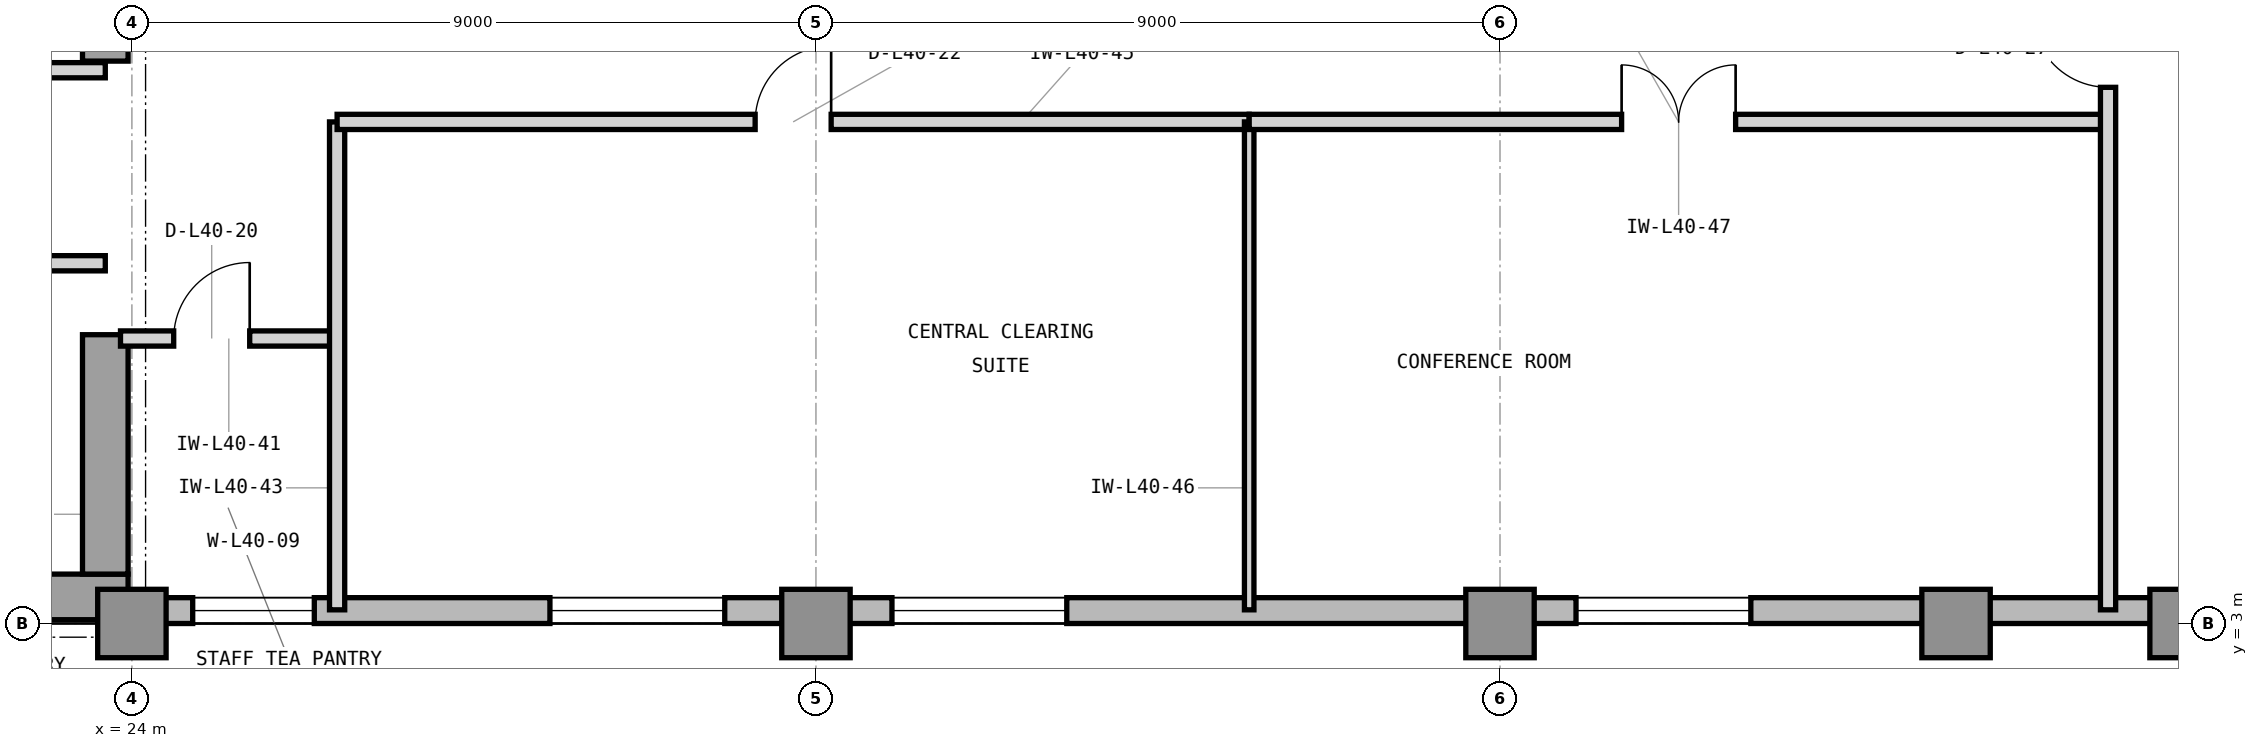
"""IFC4 building model, lengths in metres.
Left out: names, types, materials, properties, quantities, classifications, styles, units other than length and angle.
Written with IfcOpenShell. Run it as: python <this file> out.ifc"""

import sys

from ifc_helpers import new_model, si_unit, direction, frame, frame_2d, origin, origin_2d, place, context, subcontext, project, spatial, rectangle, extrude, element, fill, save


model = new_model("IFC4")
c1 = context("Model", 3, precision=1e-05, world=origin(), true_north=direction((0.0, 1.0)))
c2 = subcontext(c1, "Body", "Model", "MODEL_VIEW")
j1 = project(units=[si_unit("LENGTHUNIT", "METRE"), si_unit("PLANEANGLEUNIT", "RADIAN")], contexts=[c1])
p1 = place(None, origin())
s1 = spatial("IfcSite", under=j1, at=p1, CompositionType="ELEMENT")
p2 = place(p1, origin())
s2 = spatial("IfcBuilding", under=s1, at=p2, CompositionType="ELEMENT")
p3 = place(p2, frame((0.0, 0.0, 168.3)))
s3 = spatial("IfcBuildingStorey", under=s2, at=p3, CompositionType="ELEMENT", Elevation=168.3)
p4 = place(p3, frame((7.475, 3.35, 0.0), z_axis=(0.0, 0.0, 1.0), x_axis=(1.0, 0.0, 0.0)))
e1 = element("IfcWall", 1, at=p4, inside=s3, PredefinedType="SHEAR", context=c2, shape_type="SweptSolid", body=[
    extrude(rectangle(XDim=16.475, YDim=0.6, at=frame_2d((8.237, 0.0))), origin(), (0.0, 0.0, 1.0), 3.9),
])
p5 = place(p3, frame((23.65, 3.65, 0.0), z_axis=(0.0, 0.0, 1.0), x_axis=(0.0, 1.0, 0.0)))
e2 = element("IfcWall", 2, at=p5, inside=s3, PredefinedType="SHEAR", context=c2, shape_type="SweptSolid", body=[
    extrude(rectangle(XDim=3.15, YDim=0.6, at=frame_2d((1.575, 0.0))), origin(), (0.0, 0.0, 1.0), 3.9),
])
p6 = place(p3, frame((23.65, 10.4, 0.0), z_axis=(0.0, 0.0, 1.0), x_axis=(0.0, 1.0, 0.0)))
e3 = element("IfcWall", 3, at=p6, inside=s3, PredefinedType="SHEAR", context=c2, shape_type="SweptSolid", body=[
    extrude(rectangle(XDim=3.2, YDim=0.6, at=frame_2d((1.6, 0.0))), origin(), (0.0, 0.0, 1.0), 3.9),
])
for number, where, z_axis, x_axis in (
    (4, (24.0, 3.0, 0.0), (0.0, 0.0, 1.0), (1.0, 0.0, 0.0)),
    (5, (33.0, 3.0, 0.0), (0.0, 0.0, 1.0), (1.0, 0.0, 0.0)),
    (6, (42.0, 3.0, 0.0), (0.0, 0.0, 1.0), (1.0, 0.0, 0.0)),
    (7, (48.0, 3.0, 0.0), (0.0, 0.0, 1.0), (1.0, 0.0, 0.0)),
    (8, (51.0, 3.0, 0.0), (0.0, 0.0, 1.0), (1.0, 0.0, 0.0)),
):
    element("IfcColumn", number, at=place(p3, frame(where, z_axis=z_axis, x_axis=x_axis)), inside=s3, PredefinedType="COLUMN", context=c2, shape_type="SweptSolid", body=[
        extrude(rectangle(XDim=0.9, YDim=0.9, at=origin_2d()), origin(), (0.0, 0.0, 1.0), 3.9),
    ])
p7 = place(p3, frame((23.9, 3.17, 0.0), z_axis=(0.0, 0.0, 1.0), x_axis=(1.0, 0.0, 0.0)))
e9 = element("IfcWall", 9, at=p7, inside=s3, PredefinedType="STANDARD", context=c2, shape_type="SweptSolid", body=[
    extrude(rectangle(XDim=31.5, YDim=0.34, at=frame_2d((15.75, 0.0))), origin(), (0.0, 0.0, 1.0), 3.7),
])
p8 = place(p7, frame((5.6, 0.0, 0.9)))
e10 = element("IfcOpeningElement", 10, at=p8, cuts=e9, PredefinedType="OPENING", context=c2, shape_type="SweptSolid", body=[
    extrude(rectangle(XDim=2.3, YDim=2.2, at=frame_2d((1.15, 1.1))), frame((0.0, 0.18, 0.0), z_axis=(0.0, -1.0, 0.0), x_axis=(1.0, 0.0, 0.0)), (0.0, 0.0, 1.0), 0.36),
])
p9 = place(p7, frame((10.1, 0.0, 0.9)))
e11 = element("IfcOpeningElement", 11, at=p9, cuts=e9, PredefinedType="OPENING", context=c2, shape_type="SweptSolid", body=[
    extrude(rectangle(XDim=2.3, YDim=2.2, at=frame_2d((1.15, 1.1))), frame((0.0, 0.18, 0.0), z_axis=(0.0, -1.0, 0.0), x_axis=(1.0, 0.0, 0.0)), (0.0, 0.0, 1.0), 0.36),
])
p10 = place(p7, frame((19.1, 0.0, 0.9)))
e12 = element("IfcOpeningElement", 12, at=p10, cuts=e9, PredefinedType="OPENING", context=c2, shape_type="SweptSolid", body=[
    extrude(rectangle(XDim=2.3, YDim=2.2, at=frame_2d((1.15, 1.1))), frame((0.0, 0.18, 0.0), z_axis=(0.0, -1.0, 0.0), x_axis=(1.0, 0.0, 0.0)), (0.0, 0.0, 1.0), 0.36),
])
p11 = place(p7, frame((0.9, 0.0, 0.9)))
e13 = element("IfcOpeningElement", 13, at=p11, cuts=e9, PredefinedType="OPENING", context=c2, shape_type="SweptSolid", body=[
    extrude(rectangle(XDim=1.6, YDim=2.2, at=frame_2d((0.8, 1.1))), frame((0.0, 0.18, 0.0), z_axis=(0.0, -1.0, 0.0), x_axis=(1.0, 0.0, 0.0)), (0.0, 0.0, 1.0), 0.36),
])
p12 = place(p3, frame((20.65, 7.74, 0.0), z_axis=(0.0, 0.0, 1.0), x_axis=(1.0, 0.0, 0.0)))
e14 = element("IfcWall", 14, at=p12, inside=s3, PredefinedType="PARTITIONING", context=c2, shape_type="SweptSolid", body=[
    extrude(rectangle(XDim=3.0, YDim=0.2, at=frame_2d((1.5, 0.0))), origin(), (0.0, 0.0, 1.0), 3.69),
])
p13 = place(p12, frame((1.025, 0.0, 0.0)))
e15 = element("IfcOpeningElement", 15, at=p13, cuts=e14, PredefinedType="OPENING", context=c2, shape_type="SweptSolid", body=[
    extrude(rectangle(XDim=0.95, YDim=2.1, at=frame_2d((0.475, 1.05))), frame((0.0, 0.11, 0.0), z_axis=(0.0, -1.0, 0.0), x_axis=(1.0, 0.0, 0.0)), (0.0, 0.0, 1.0), 0.22),
])
p14 = place(p3, frame((14.825, 10.28, 0.0), z_axis=(0.0, 0.0, 1.0), x_axis=(1.0, 0.0, 0.0)))
e16 = element("IfcWall", 16, at=p14, inside=s3, PredefinedType="PARTITIONING", context=c2, shape_type="SweptSolid", body=[
    extrude(rectangle(XDim=8.825, YDim=0.2, at=frame_2d((4.413, 0.0))), origin(), (0.0, 0.0, 1.0), 3.69),
])
p15 = place(p3, frame((23.85, 6.75, 0.0), z_axis=(0.0, 0.0, 1.0), x_axis=(1.0, 0.0, 0.0)))
e17 = element("IfcWall", 17, at=p15, inside=s3, PredefinedType="PARTITIONING", context=c2, shape_type="SweptSolid", body=[
    extrude(rectangle(XDim=2.85, YDim=0.2, at=frame_2d((1.425, 0.0))), origin(), (0.0, 0.0, 1.0), 3.69),
])
p16 = place(p15, frame((0.7, 0.0, 0.0)))
e18 = element("IfcOpeningElement", 18, at=p16, cuts=e17, PredefinedType="OPENING", context=c2, shape_type="SweptSolid", body=[
    extrude(rectangle(XDim=1.0, YDim=2.15, at=frame_2d((0.5, 1.075))), frame((0.0, 0.11, 0.0), z_axis=(0.0, -1.0, 0.0), x_axis=(1.0, 0.0, 0.0)), (0.0, 0.0, 1.0), 0.22),
])
p17 = place(p3, frame((26.7, 3.18, 0.0), z_axis=(0.0, 0.0, 1.0), x_axis=(0.0, 1.0, 0.0)))
e19 = element("IfcWall", 19, at=p17, inside=s3, PredefinedType="PARTITIONING", context=c2, shape_type="SweptSolid", body=[
    extrude(rectangle(XDim=6.42, YDim=0.2, at=frame_2d((3.21, 0.0))), origin(), (0.0, 0.0, 1.0), 3.69),
])
p18 = place(p3, frame((26.7, 9.6, 0.0), z_axis=(0.0, 0.0, 1.0), x_axis=(1.0, 0.0, 0.0)))
e20 = element("IfcWall", 20, at=p18, inside=s3, PredefinedType="PARTITIONING", context=c2, shape_type="SweptSolid", body=[
    extrude(rectangle(XDim=12.0, YDim=0.2, at=frame_2d((6.0, 0.0))), origin(), (0.0, 0.0, 1.0), 3.69),
])
p19 = place(p18, frame((5.5, 0.0, 0.0)))
e21 = element("IfcOpeningElement", 21, at=p19, cuts=e20, PredefinedType="OPENING", context=c2, shape_type="SweptSolid", body=[
    extrude(rectangle(XDim=1.0, YDim=2.15, at=frame_2d((0.5, 1.075))), frame((0.0, 0.11, 0.0), z_axis=(0.0, -1.0, 0.0), x_axis=(1.0, 0.0, 0.0)), (0.0, 0.0, 1.0), 0.22),
])
p20 = place(p3, frame((38.7, 3.18, 0.0), z_axis=(0.0, 0.0, 1.0), x_axis=(0.0, 1.0, 0.0)))
e22 = element("IfcWall", 22, at=p20, inside=s3, PredefinedType="PARTITIONING", context=c2, shape_type="SweptSolid", body=[
    extrude(rectangle(XDim=6.42, YDim=0.125, at=frame_2d((3.21, 0.0))), origin(), (0.0, 0.0, 1.0), 3.69),
])
p21 = place(p3, frame((38.7, 9.6, 0.0), z_axis=(0.0, 0.0, 1.0), x_axis=(1.0, 0.0, 0.0)))
e23 = element("IfcWall", 23, at=p21, inside=s3, PredefinedType="PARTITIONING", context=c2, shape_type="SweptSolid", body=[
    extrude(rectangle(XDim=11.3, YDim=0.2, at=frame_2d((5.65, 0.0))), origin(), (0.0, 0.0, 1.0), 3.69),
])
p22 = place(p21, frame((4.9, 0.0, 0.0)))
e24 = element("IfcOpeningElement", 24, at=p22, cuts=e23, PredefinedType="OPENING", context=c2, shape_type="SweptSolid", body=[
    extrude(rectangle(XDim=1.5, YDim=2.3, at=frame_2d((0.75, 1.15))), frame((0.0, 0.11, 0.0), z_axis=(0.0, -1.0, 0.0), x_axis=(1.0, 0.0, 0.0)), (0.0, 0.0, 1.0), 0.22),
])
p23 = place(p3, frame((50.0, 3.18, 0.0), z_axis=(0.0, 0.0, 1.0), x_axis=(0.0, 1.0, 0.0)))
e25 = element("IfcWall", 25, at=p23, inside=s3, PredefinedType="PARTITIONING", context=c2, shape_type="SweptSolid", body=[
    extrude(rectangle(XDim=17.64, YDim=0.2, at=frame_2d((8.82, 0.0))), origin(), (0.0, 0.0, 1.0), 3.69),
])
p24 = place(p23, frame((6.875, 0.0, 0.0)))
e26 = element("IfcOpeningElement", 26, at=p24, cuts=e25, PredefinedType="OPENING", context=c2, shape_type="SweptSolid", body=[
    extrude(rectangle(XDim=1.0, YDim=2.15, at=frame_2d((0.5, 1.075))), frame((0.0, 0.11, 0.0), z_axis=(0.0, -1.0, 0.0), x_axis=(1.0, 0.0, 0.0)), (0.0, 0.0, 1.0), 0.22),
])
p25 = place(p8, origin())
e27 = element("IfcWindow", 27, at=p25, inside=s3, PartitioningType="SINGLE_PANEL", PredefinedType="WINDOW", context=c2, shape_type="SweptSolid", body=[
    extrude(rectangle(XDim=2.3, YDim=2.2, at=frame_2d((1.15, 1.1))), frame((0.0, 0.11, 0.0), z_axis=(0.0, -1.0, 0.0), x_axis=(1.0, 0.0, 0.0)), (0.0, 0.0, 1.0), 0.06),
])
fill(e10, e27)
p26 = place(p9, origin())
e28 = element("IfcWindow", 28, at=p26, inside=s3, PartitioningType="SINGLE_PANEL", PredefinedType="WINDOW", context=c2, shape_type="SweptSolid", body=[
    extrude(rectangle(XDim=2.3, YDim=2.2, at=frame_2d((1.15, 1.1))), frame((0.0, 0.11, 0.0), z_axis=(0.0, -1.0, 0.0), x_axis=(1.0, 0.0, 0.0)), (0.0, 0.0, 1.0), 0.06),
])
fill(e11, e28)
p27 = place(p10, origin())
e29 = element("IfcWindow", 29, at=p27, inside=s3, PartitioningType="SINGLE_PANEL", PredefinedType="WINDOW", context=c2, shape_type="SweptSolid", body=[
    extrude(rectangle(XDim=2.3, YDim=2.2, at=frame_2d((1.15, 1.1))), frame((0.0, 0.11, 0.0), z_axis=(0.0, -1.0, 0.0), x_axis=(1.0, 0.0, 0.0)), (0.0, 0.0, 1.0), 0.06),
])
fill(e12, e29)
p28 = place(p16, origin())
e30 = element("IfcDoor", 30, at=p28, inside=s3, OperationType="SINGLE_SWING_RIGHT", PredefinedType="DOOR", context=c2, shape_type="SweptSolid", body=[
    extrude(rectangle(XDim=1.0, YDim=2.15, at=frame_2d((0.5, 1.075))), frame((0.0, 0.025, 0.0), z_axis=(0.0, -1.0, 0.0), x_axis=(1.0, 0.0, 0.0)), (0.0, 0.0, 1.0), 0.05),
])
fill(e18, e30)
p29 = place(p19, origin())
e31 = element("IfcDoor", 31, at=p29, inside=s3, OperationType="SINGLE_SWING_RIGHT", PredefinedType="DOOR", context=c2, shape_type="SweptSolid", body=[
    extrude(rectangle(XDim=1.0, YDim=2.15, at=frame_2d((0.5, 1.075))), frame((0.0, 0.025, 0.0), z_axis=(0.0, -1.0, 0.0), x_axis=(1.0, 0.0, 0.0)), (0.0, 0.0, 1.0), 0.05),
])
fill(e21, e31)
p30 = place(p22, origin())
e32 = element("IfcDoor", 32, at=p30, inside=s3, OperationType="DOUBLE_DOOR_SINGLE_SWING", PredefinedType="DOOR", context=c2, shape_type="SweptSolid", body=[
    extrude(rectangle(XDim=1.5, YDim=2.3, at=frame_2d((0.75, 1.15))), frame((0.0, 0.025, 0.0), z_axis=(0.0, -1.0, 0.0), x_axis=(1.0, 0.0, 0.0)), (0.0, 0.0, 1.0), 0.05),
])
fill(e24, e32)
p31 = place(p24, origin())
e33 = element("IfcDoor", 33, at=p31, inside=s3, OperationType="SINGLE_SWING_RIGHT", PredefinedType="DOOR", context=c2, shape_type="SweptSolid", body=[
    extrude(rectangle(XDim=1.0, YDim=2.15, at=frame_2d((0.5, 1.075))), frame((0.0, 0.025, 0.0), z_axis=(0.0, -1.0, 0.0), x_axis=(1.0, 0.0, 0.0)), (0.0, 0.0, 1.0), 0.05),
])
fill(e26, e33)
p32 = place(p11, origin())
e34 = element("IfcWindow", 34, at=p32, inside=s3, PartitioningType="SINGLE_PANEL", PredefinedType="WINDOW", context=c2, shape_type="SweptSolid", body=[
    extrude(rectangle(XDim=1.6, YDim=2.2, at=frame_2d((0.8, 1.1))), frame((0.0, 0.11, 0.0), z_axis=(0.0, -1.0, 0.0), x_axis=(1.0, 0.0, 0.0)), (0.0, 0.0, 1.0), 0.06),
])
fill(e13, e34)
save(model, sys.argv[1])
